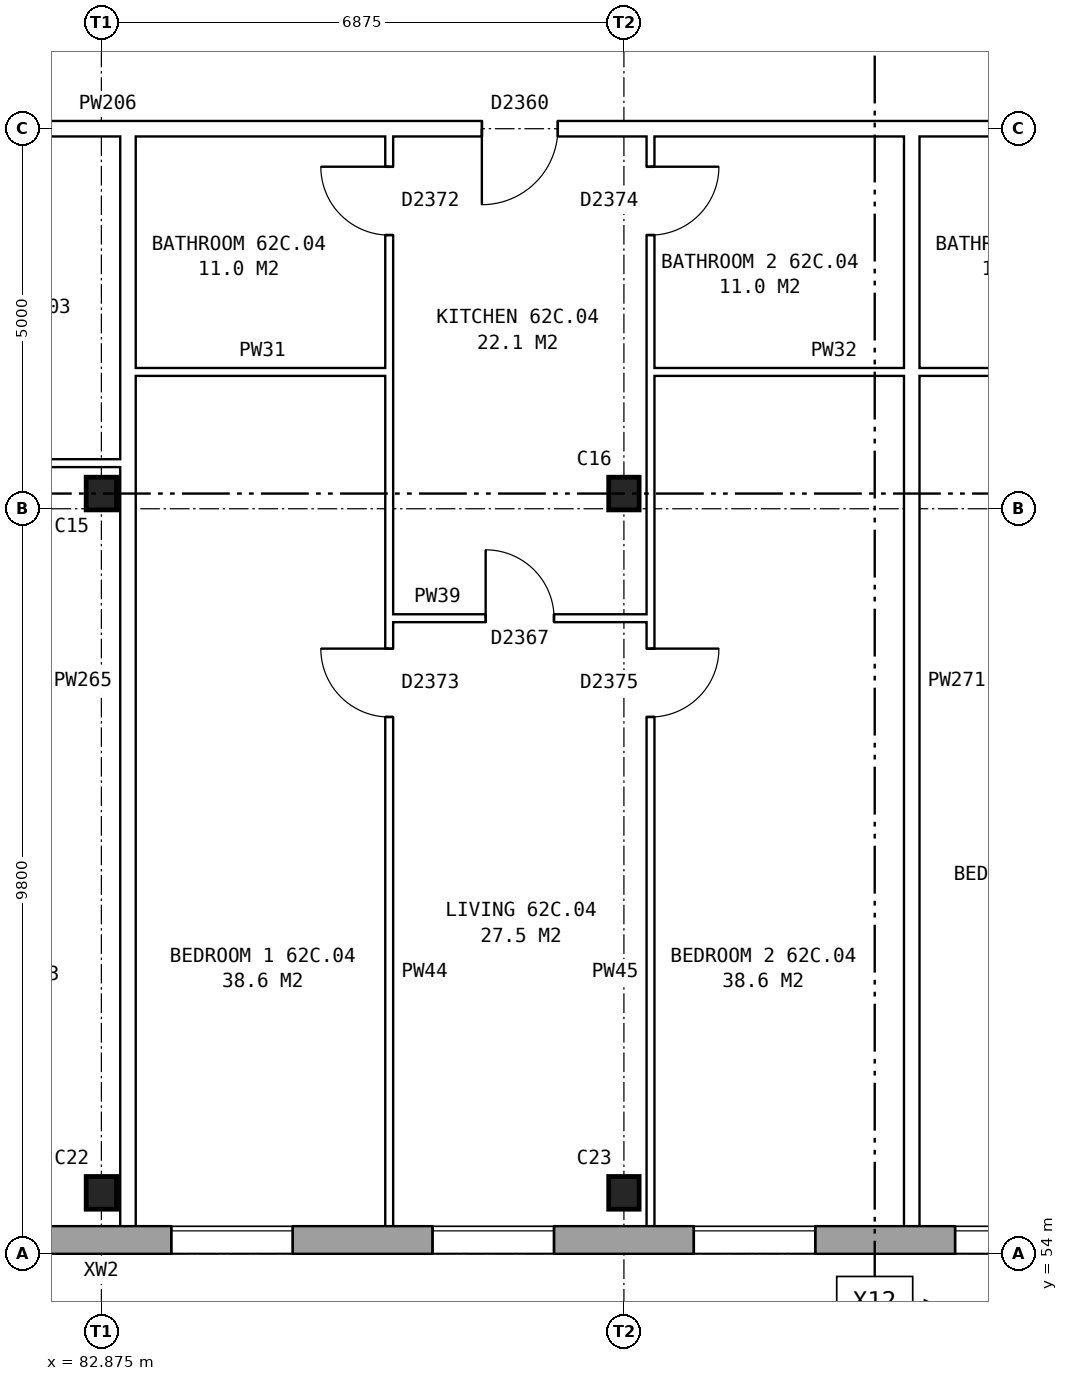
"""IFC4 building model, lengths in metres.
Left out: names, types, materials, properties, quantities, classifications, styles, units other than length and angle.
Written with IfcOpenShell. Run it as: python <this file> out.ifc"""

import sys

from ifc_helpers import new_model, si_unit, direction, frame, frame_2d, origin, origin_2d, place, context, subcontext, project, spatial, rectangle, i_section, extrude, element, fill, save


model = new_model("IFC4")
c1 = context("Model", 3, precision=1e-05, world=origin(), true_north=direction((0.0, 1.0)))
c2 = subcontext(c1, "Body", "Model", "MODEL_VIEW")
j1 = project(units=[si_unit("LENGTHUNIT", "METRE"), si_unit("PLANEANGLEUNIT", "RADIAN")], contexts=[c1])
p1 = place(None, origin())
s1 = spatial("IfcSite", under=j1, at=p1, CompositionType="ELEMENT")
p2 = place(p1, origin())
s2 = spatial("IfcBuilding", under=s1, at=p2, CompositionType="ELEMENT")
p3 = place(p2, frame((0.0, 0.0, 221.4)))
s3 = spatial("IfcBuildingStorey", under=s2, at=p3, CompositionType="ELEMENT", Elevation=221.4)
for number, where, z_axis, x_axis in (
    (1, (82.875, 54.8, 0.0), (0.0, 0.0, 1.0), (1.0, 0.0, 0.0)),
    (2, (89.75, 54.8, 0.0), (0.0, 0.0, 1.0), (1.0, 0.0, 0.0)),
    (3, (82.875, 64.0, 0.0), (0.0, 0.0, 1.0), (1.0, 0.0, 0.0)),
    (4, (89.75, 64.0, 0.0), (0.0, 0.0, 1.0), (1.0, 0.0, 0.0)),
):
    element("IfcColumn", number, at=place(p3, frame(where, z_axis=z_axis, x_axis=x_axis)), inside=s3, PredefinedType="COLUMN", context=c2, shape_type="SweptSolid", body=[
        extrude(i_section(OverallWidth=0.4, OverallDepth=0.43, WebThickness=0.04, FlangeThickness=0.04, at=origin_2d()), origin(), (0.0, 0.0, 1.0), 2.85),
    ])
p4 = place(p3, frame((75.95, 54.18, 0.0), z_axis=(0.0, 0.0, 1.0), x_axis=(1.0, 0.0, 0.0)))
e5 = element("IfcWall", 5, at=p4, inside=s3, PredefinedType="STANDARD", context=c2, shape_type="SweptSolid", body=[
    extrude(rectangle(XDim=55.1, YDim=0.36, at=frame_2d((27.55, 0.0))), origin(), (0.0, 0.0, 1.0), 2.85),
])
p5 = place(p4, frame((0.969, 0.0, 0.8)))
e6 = element("IfcOpeningElement", 6, at=p5, cuts=e5, PredefinedType="OPENING", context=c2, shape_type="SweptSolid", body=[
    extrude(rectangle(XDim=1.6, YDim=1.8, at=frame_2d((0.8, 0.9))), frame((0.0, 0.19, 0.0), z_axis=(0.0, -1.0, 0.0), x_axis=(1.0, 0.0, 0.0)), (0.0, 0.0, 1.0), 0.38),
])
p6 = place(p4, frame((4.406, 0.0, 0.8)))
e7 = element("IfcOpeningElement", 7, at=p6, cuts=e5, PredefinedType="OPENING", context=c2, shape_type="SweptSolid", body=[
    extrude(rectangle(XDim=1.6, YDim=1.8, at=frame_2d((0.8, 0.9))), frame((0.0, 0.19, 0.0), z_axis=(0.0, -1.0, 0.0), x_axis=(1.0, 0.0, 0.0)), (0.0, 0.0, 1.0), 0.38),
])
p7 = place(p4, frame((7.844, 0.0, 0.8)))
e8 = element("IfcOpeningElement", 8, at=p7, cuts=e5, PredefinedType="OPENING", context=c2, shape_type="SweptSolid", body=[
    extrude(rectangle(XDim=1.6, YDim=1.8, at=frame_2d((0.8, 0.9))), frame((0.0, 0.19, 0.0), z_axis=(0.0, -1.0, 0.0), x_axis=(1.0, 0.0, 0.0)), (0.0, 0.0, 1.0), 0.38),
])
p8 = place(p4, frame((11.281, 0.0, 0.8)))
e9 = element("IfcOpeningElement", 9, at=p8, cuts=e5, PredefinedType="OPENING", context=c2, shape_type="SweptSolid", body=[
    extrude(rectangle(XDim=1.6, YDim=1.8, at=frame_2d((0.8, 0.9))), frame((0.0, 0.19, 0.0), z_axis=(0.0, -1.0, 0.0), x_axis=(1.0, 0.0, 0.0)), (0.0, 0.0, 1.0), 0.38),
])
p9 = place(p4, frame((14.719, 0.0, 0.8)))
e10 = element("IfcOpeningElement", 10, at=p9, cuts=e5, PredefinedType="OPENING", context=c2, shape_type="SweptSolid", body=[
    extrude(rectangle(XDim=1.6, YDim=1.8, at=frame_2d((0.8, 0.9))), frame((0.0, 0.19, 0.0), z_axis=(0.0, -1.0, 0.0), x_axis=(1.0, 0.0, 0.0)), (0.0, 0.0, 1.0), 0.38),
])
p10 = place(p4, frame((18.156, 0.0, 0.8)))
e11 = element("IfcOpeningElement", 11, at=p10, cuts=e5, PredefinedType="OPENING", context=c2, shape_type="SweptSolid", body=[
    extrude(rectangle(XDim=1.6, YDim=1.8, at=frame_2d((0.8, 0.9))), frame((0.0, 0.19, 0.0), z_axis=(0.0, -1.0, 0.0), x_axis=(1.0, 0.0, 0.0)), (0.0, 0.0, 1.0), 0.38),
])
p11 = place(p4, frame((21.594, 0.0, 0.8)))
e12 = element("IfcOpeningElement", 12, at=p11, cuts=e5, PredefinedType="OPENING", context=c2, shape_type="SweptSolid", body=[
    extrude(rectangle(XDim=1.6, YDim=1.8, at=frame_2d((0.8, 0.9))), frame((0.0, 0.19, 0.0), z_axis=(0.0, -1.0, 0.0), x_axis=(1.0, 0.0, 0.0)), (0.0, 0.0, 1.0), 0.38),
])
p12 = place(p4, frame((25.031, 0.0, 0.8)))
e13 = element("IfcOpeningElement", 13, at=p12, cuts=e5, PredefinedType="OPENING", context=c2, shape_type="SweptSolid", body=[
    extrude(rectangle(XDim=1.6, YDim=1.8, at=frame_2d((0.8, 0.9))), frame((0.0, 0.19, 0.0), z_axis=(0.0, -1.0, 0.0), x_axis=(1.0, 0.0, 0.0)), (0.0, 0.0, 1.0), 0.38),
])
p13 = place(p4, frame((28.469, 0.0, 0.8)))
e14 = element("IfcOpeningElement", 14, at=p13, cuts=e5, PredefinedType="OPENING", context=c2, shape_type="SweptSolid", body=[
    extrude(rectangle(XDim=1.6, YDim=1.8, at=frame_2d((0.8, 0.9))), frame((0.0, 0.19, 0.0), z_axis=(0.0, -1.0, 0.0), x_axis=(1.0, 0.0, 0.0)), (0.0, 0.0, 1.0), 0.38),
])
p14 = place(p4, frame((31.906, 0.0, 0.8)))
e15 = element("IfcOpeningElement", 15, at=p14, cuts=e5, PredefinedType="OPENING", context=c2, shape_type="SweptSolid", body=[
    extrude(rectangle(XDim=1.6, YDim=1.8, at=frame_2d((0.8, 0.9))), frame((0.0, 0.19, 0.0), z_axis=(0.0, -1.0, 0.0), x_axis=(1.0, 0.0, 0.0)), (0.0, 0.0, 1.0), 0.38),
])
p15 = place(p4, frame((35.344, 0.0, 0.8)))
e16 = element("IfcOpeningElement", 16, at=p15, cuts=e5, PredefinedType="OPENING", context=c2, shape_type="SweptSolid", body=[
    extrude(rectangle(XDim=1.6, YDim=1.8, at=frame_2d((0.8, 0.9))), frame((0.0, 0.19, 0.0), z_axis=(0.0, -1.0, 0.0), x_axis=(1.0, 0.0, 0.0)), (0.0, 0.0, 1.0), 0.38),
])
p16 = place(p4, frame((38.781, 0.0, 0.8)))
e17 = element("IfcOpeningElement", 17, at=p16, cuts=e5, PredefinedType="OPENING", context=c2, shape_type="SweptSolid", body=[
    extrude(rectangle(XDim=1.6, YDim=1.8, at=frame_2d((0.8, 0.9))), frame((0.0, 0.19, 0.0), z_axis=(0.0, -1.0, 0.0), x_axis=(1.0, 0.0, 0.0)), (0.0, 0.0, 1.0), 0.38),
])
p17 = place(p4, frame((42.219, 0.0, 0.8)))
e18 = element("IfcOpeningElement", 18, at=p17, cuts=e5, PredefinedType="OPENING", context=c2, shape_type="SweptSolid", body=[
    extrude(rectangle(XDim=1.6, YDim=1.8, at=frame_2d((0.8, 0.9))), frame((0.0, 0.19, 0.0), z_axis=(0.0, -1.0, 0.0), x_axis=(1.0, 0.0, 0.0)), (0.0, 0.0, 1.0), 0.38),
])
p18 = place(p4, frame((45.656, 0.0, 0.8)))
e19 = element("IfcOpeningElement", 19, at=p18, cuts=e5, PredefinedType="OPENING", context=c2, shape_type="SweptSolid", body=[
    extrude(rectangle(XDim=1.6, YDim=1.8, at=frame_2d((0.8, 0.9))), frame((0.0, 0.19, 0.0), z_axis=(0.0, -1.0, 0.0), x_axis=(1.0, 0.0, 0.0)), (0.0, 0.0, 1.0), 0.38),
])
p19 = place(p4, frame((49.094, 0.0, 0.8)))
e20 = element("IfcOpeningElement", 20, at=p19, cuts=e5, PredefinedType="OPENING", context=c2, shape_type="SweptSolid", body=[
    extrude(rectangle(XDim=1.6, YDim=1.8, at=frame_2d((0.8, 0.9))), frame((0.0, 0.19, 0.0), z_axis=(0.0, -1.0, 0.0), x_axis=(1.0, 0.0, 0.0)), (0.0, 0.0, 1.0), 0.38),
])
p20 = place(p4, frame((52.531, 0.0, 0.8)))
e21 = element("IfcOpeningElement", 21, at=p20, cuts=e5, PredefinedType="OPENING", context=c2, shape_type="SweptSolid", body=[
    extrude(rectangle(XDim=1.6, YDim=1.8, at=frame_2d((0.8, 0.9))), frame((0.0, 0.19, 0.0), z_axis=(0.0, -1.0, 0.0), x_axis=(1.0, 0.0, 0.0)), (0.0, 0.0, 1.0), 0.38),
])
p21 = place(p3, frame((86.662, 62.36, 0.0), z_axis=(0.0, 0.0, 1.0), x_axis=(1.0, 0.0, 0.0)))
e22 = element("IfcWall", 22, at=p21, inside=s3, PredefinedType="PARTITIONING", context=c2, shape_type="SweptSolid", body=[
    extrude(rectangle(XDim=3.438, YDim=0.1, at=frame_2d((1.719, 0.0))), origin(), (0.0, 0.0, 1.0), 2.85),
])
p22 = place(p21, frame((1.269, 0.0, 0.0)))
e23 = element("IfcOpeningElement", 23, at=p22, cuts=e22, PredefinedType="OPENING", context=c2, shape_type="SweptSolid", body=[
    extrude(rectangle(XDim=0.9, YDim=2.1, at=frame_2d((0.45, 1.05))), frame((0.0, 0.06, 0.0), z_axis=(0.0, -1.0, 0.0), x_axis=(1.0, 0.0, 0.0)), (0.0, 0.0, 1.0), 0.12),
])
p23 = place(p3, frame((79.438, 64.4, 0.0), z_axis=(0.0, 0.0, 1.0), x_axis=(1.0, 0.0, 0.0)))
e24 = element("IfcWall", 24, at=p23, inside=s3, PredefinedType="PARTITIONING", context=c2, shape_type="SweptSolid", body=[
    extrude(rectangle(XDim=3.687, YDim=0.1, at=frame_2d((1.844, 0.0))), origin(), (0.0, 0.0, 1.0), 2.85),
])
p24 = place(p3, frame((83.325, 65.6, 0.0), z_axis=(0.0, 0.0, 1.0), x_axis=(1.0, 0.0, 0.0)))
e25 = element("IfcWall", 25, at=p24, inside=s3, PredefinedType="PARTITIONING", context=c2, shape_type="SweptSolid", body=[
    extrude(rectangle(XDim=3.337, YDim=0.1, at=frame_2d((1.668, 0.0))), origin(), (0.0, 0.0, 1.0), 2.85),
])
p25 = place(p3, frame((90.1, 65.6, 0.0), z_axis=(0.0, 0.0, 1.0), x_axis=(1.0, 0.0, 0.0)))
e26 = element("IfcWall", 26, at=p25, inside=s3, PredefinedType="PARTITIONING", context=c2, shape_type="SweptSolid", body=[
    extrude(rectangle(XDim=6.875, YDim=0.1, at=frame_2d((3.438, 0.0))), origin(), (0.0, 0.0, 1.0), 2.85),
])
p26 = place(p3, frame((75.64, 68.8, 0.0), z_axis=(0.0, 0.0, 1.0), x_axis=(1.0, 0.0, 0.0)))
e27 = element("IfcWall", 27, at=p26, inside=s3, PredefinedType="PARTITIONING", context=c2, shape_type="SweptSolid", body=[
    extrude(rectangle(XDim=55.72, YDim=0.2, at=frame_2d((27.86, 0.0))), origin(), (0.0, 0.0, 1.0), 2.85),
])
p27 = place(p26, frame((1.399, 0.0, 0.0)))
e28 = element("IfcOpeningElement", 28, at=p27, cuts=e27, PredefinedType="OPENING", context=c2, shape_type="SweptSolid", body=[
    extrude(rectangle(XDim=1.0, YDim=2.1, at=frame_2d((0.5, 1.05))), frame((0.0, 0.11, 0.0), z_axis=(0.0, -1.0, 0.0), x_axis=(1.0, 0.0, 0.0)), (0.0, 0.0, 1.0), 0.22),
])
p28 = place(p26, frame((12.241, 0.0, 0.0)))
e29 = element("IfcOpeningElement", 29, at=p28, cuts=e27, PredefinedType="OPENING", context=c2, shape_type="SweptSolid", body=[
    extrude(rectangle(XDim=1.0, YDim=2.1, at=frame_2d((0.5, 1.05))), frame((0.0, 0.11, 0.0), z_axis=(0.0, -1.0, 0.0), x_axis=(1.0, 0.0, 0.0)), (0.0, 0.0, 1.0), 0.22),
])
p29 = place(p26, frame((22.553, 0.0, 0.0)))
e30 = element("IfcOpeningElement", 30, at=p29, cuts=e27, PredefinedType="OPENING", context=c2, shape_type="SweptSolid", body=[
    extrude(rectangle(XDim=1.0, YDim=2.1, at=frame_2d((0.5, 1.05))), frame((0.0, 0.11, 0.0), z_axis=(0.0, -1.0, 0.0), x_axis=(1.0, 0.0, 0.0)), (0.0, 0.0, 1.0), 0.22),
])
p30 = place(p26, frame((32.866, 0.0, 0.0)))
e31 = element("IfcOpeningElement", 31, at=p30, cuts=e27, PredefinedType="OPENING", context=c2, shape_type="SweptSolid", body=[
    extrude(rectangle(XDim=1.0, YDim=2.1, at=frame_2d((0.5, 1.05))), frame((0.0, 0.11, 0.0), z_axis=(0.0, -1.0, 0.0), x_axis=(1.0, 0.0, 0.0)), (0.0, 0.0, 1.0), 0.22),
])
p31 = place(p26, frame((36.303, 0.0, 0.0)))
e32 = element("IfcOpeningElement", 32, at=p31, cuts=e27, PredefinedType="OPENING", context=c2, shape_type="SweptSolid", body=[
    extrude(rectangle(XDim=1.0, YDim=2.1, at=frame_2d((0.5, 1.05))), frame((0.0, 0.11, 0.0), z_axis=(0.0, -1.0, 0.0), x_axis=(1.0, 0.0, 0.0)), (0.0, 0.0, 1.0), 0.22),
])
p32 = place(p26, frame((46.616, 0.0, 0.0)))
e33 = element("IfcOpeningElement", 33, at=p32, cuts=e27, PredefinedType="OPENING", context=c2, shape_type="SweptSolid", body=[
    extrude(rectangle(XDim=1.0, YDim=2.1, at=frame_2d((0.5, 1.05))), frame((0.0, 0.11, 0.0), z_axis=(0.0, -1.0, 0.0), x_axis=(1.0, 0.0, 0.0)), (0.0, 0.0, 1.0), 0.22),
])
p33 = place(p26, frame((50.053, 0.0, 0.0)))
e34 = element("IfcOpeningElement", 34, at=p33, cuts=e27, PredefinedType="OPENING", context=c2, shape_type="SweptSolid", body=[
    extrude(rectangle(XDim=1.0, YDim=2.1, at=frame_2d((0.5, 1.05))), frame((0.0, 0.11, 0.0), z_axis=(0.0, -1.0, 0.0), x_axis=(1.0, 0.0, 0.0)), (0.0, 0.0, 1.0), 0.22),
])
p34 = place(p3, frame((83.225, 54.36, 0.0), z_axis=(0.0, 0.0, 1.0), x_axis=(0.0, 1.0, 0.0)))
e35 = element("IfcWall", 35, at=p34, inside=s3, PredefinedType="PARTITIONING", context=c2, shape_type="SweptSolid", body=[
    extrude(rectangle(XDim=14.34, YDim=0.2, at=frame_2d((7.17, 0.0))), origin(), (0.0, 0.0, 1.0), 2.85),
])
p35 = place(p3, frame((86.662, 54.36, 0.0), z_axis=(0.0, 0.0, 1.0), x_axis=(0.0, 1.0, 0.0)))
e36 = element("IfcWall", 36, at=p35, inside=s3, PredefinedType="PARTITIONING", context=c2, shape_type="SweptSolid", body=[
    extrude(rectangle(XDim=14.34, YDim=0.1, at=frame_2d((7.17, 0.0))), origin(), (0.0, 0.0, 1.0), 2.85),
])
p36 = place(p35, frame((6.7, 0.0, 0.0)))
e37 = element("IfcOpeningElement", 37, at=p36, cuts=e36, PredefinedType="OPENING", context=c2, shape_type="SweptSolid", body=[
    extrude(rectangle(XDim=0.9, YDim=2.1, at=frame_2d((0.45, 1.05))), frame((0.0, 0.06, 0.0), z_axis=(0.0, -1.0, 0.0), x_axis=(1.0, 0.0, 0.0)), (0.0, 0.0, 1.0), 0.12),
])
p37 = place(p35, frame((13.04, 0.0, 0.0)))
e38 = element("IfcOpeningElement", 38, at=p37, cuts=e36, PredefinedType="OPENING", context=c2, shape_type="SweptSolid", body=[
    extrude(rectangle(XDim=0.9, YDim=2.1, at=frame_2d((0.45, 1.05))), frame((0.0, 0.06, 0.0), z_axis=(0.0, -1.0, 0.0), x_axis=(1.0, 0.0, 0.0)), (0.0, 0.0, 1.0), 0.12),
])
p38 = place(p3, frame((90.1, 54.36, 0.0), z_axis=(0.0, 0.0, 1.0), x_axis=(0.0, 1.0, 0.0)))
e39 = element("IfcWall", 39, at=p38, inside=s3, PredefinedType="PARTITIONING", context=c2, shape_type="SweptSolid", body=[
    extrude(rectangle(XDim=14.34, YDim=0.1, at=frame_2d((7.17, 0.0))), origin(), (0.0, 0.0, 1.0), 2.85),
])
p39 = place(p38, frame((6.7, 0.0, 0.0)))
e40 = element("IfcOpeningElement", 40, at=p39, cuts=e39, PredefinedType="OPENING", context=c2, shape_type="SweptSolid", body=[
    extrude(rectangle(XDim=0.9, YDim=2.1, at=frame_2d((0.45, 1.05))), frame((0.0, 0.06, 0.0), z_axis=(0.0, -1.0, 0.0), x_axis=(1.0, 0.0, 0.0)), (0.0, 0.0, 1.0), 0.12),
])
p40 = place(p38, frame((13.04, 0.0, 0.0)))
e41 = element("IfcOpeningElement", 41, at=p40, cuts=e39, PredefinedType="OPENING", context=c2, shape_type="SweptSolid", body=[
    extrude(rectangle(XDim=0.9, YDim=2.1, at=frame_2d((0.45, 1.05))), frame((0.0, 0.06, 0.0), z_axis=(0.0, -1.0, 0.0), x_axis=(1.0, 0.0, 0.0)), (0.0, 0.0, 1.0), 0.12),
])
p41 = place(p3, frame((93.537, 54.36, 0.0), z_axis=(0.0, 0.0, 1.0), x_axis=(0.0, 1.0, 0.0)))
e42 = element("IfcWall", 42, at=p41, inside=s3, PredefinedType="PARTITIONING", context=c2, shape_type="SweptSolid", body=[
    extrude(rectangle(XDim=14.34, YDim=0.2, at=frame_2d((7.17, 0.0))), origin(), (0.0, 0.0, 1.0), 2.85),
])
p42 = place(p7, origin())
e43 = element("IfcWindow", 43, at=p42, inside=s3, PartitioningType="SINGLE_PANEL", PredefinedType="WINDOW", context=c2, shape_type="SweptSolid", body=[
    extrude(rectangle(XDim=1.6, YDim=1.8, at=frame_2d((0.8, 0.9))), frame((0.0, 0.15, 0.0), z_axis=(0.0, -1.0, 0.0), x_axis=(1.0, 0.0, 0.0)), (0.0, 0.0, 1.0), 0.06),
])
fill(e8, e43)
p43 = place(p8, origin())
e44 = element("IfcWindow", 44, at=p43, inside=s3, PartitioningType="SINGLE_PANEL", PredefinedType="WINDOW", context=c2, shape_type="SweptSolid", body=[
    extrude(rectangle(XDim=1.6, YDim=1.8, at=frame_2d((0.8, 0.9))), frame((0.0, 0.15, 0.0), z_axis=(0.0, -1.0, 0.0), x_axis=(1.0, 0.0, 0.0)), (0.0, 0.0, 1.0), 0.06),
])
fill(e9, e44)
p44 = place(p9, origin())
e45 = element("IfcWindow", 45, at=p44, inside=s3, PartitioningType="SINGLE_PANEL", PredefinedType="WINDOW", context=c2, shape_type="SweptSolid", body=[
    extrude(rectangle(XDim=1.6, YDim=1.8, at=frame_2d((0.8, 0.9))), frame((0.0, 0.15, 0.0), z_axis=(0.0, -1.0, 0.0), x_axis=(1.0, 0.0, 0.0)), (0.0, 0.0, 1.0), 0.06),
])
fill(e10, e45)
p45 = place(p10, origin())
e46 = element("IfcWindow", 46, at=p45, inside=s3, PartitioningType="SINGLE_PANEL", PredefinedType="WINDOW", context=c2, shape_type="SweptSolid", body=[
    extrude(rectangle(XDim=1.6, YDim=1.8, at=frame_2d((0.8, 0.9))), frame((0.0, 0.15, 0.0), z_axis=(0.0, -1.0, 0.0), x_axis=(1.0, 0.0, 0.0)), (0.0, 0.0, 1.0), 0.06),
])
fill(e11, e46)
p46 = place(p36, origin())
e47 = element("IfcDoor", 47, at=p46, inside=s3, OperationType="SINGLE_SWING_RIGHT", PredefinedType="DOOR", context=c2, shape_type="SweptSolid", body=[
    extrude(rectangle(XDim=0.9, YDim=2.1, at=frame_2d((0.45, 1.05))), frame((0.0, 0.025, 0.0), z_axis=(0.0, -1.0, 0.0), x_axis=(1.0, 0.0, 0.0)), (0.0, 0.0, 1.0), 0.05),
])
fill(e37, e47)
p47 = place(p39, frame((0.9, 0.0, 0.0), z_axis=(0.0, 0.0, 1.0), x_axis=(-1.0, 0.0, 0.0)))
e48 = element("IfcDoor", 48, at=p47, inside=s3, OperationType="SINGLE_SWING_LEFT", PredefinedType="DOOR", context=c2, shape_type="SweptSolid", body=[
    extrude(rectangle(XDim=0.9, YDim=2.1, at=frame_2d((0.45, 1.05))), frame((0.0, 0.025, 0.0), z_axis=(0.0, -1.0, 0.0), x_axis=(1.0, 0.0, 0.0)), (0.0, 0.0, 1.0), 0.05),
])
fill(e40, e48)
p48 = place(p28, frame((1.0, 0.0, 0.0), z_axis=(0.0, 0.0, 1.0), x_axis=(-1.0, 0.0, 0.0)))
e49 = element("IfcDoor", 49, at=p48, inside=s3, OperationType="SINGLE_SWING_RIGHT", PredefinedType="DOOR", context=c2, shape_type="SweptSolid", body=[
    extrude(rectangle(XDim=1.0, YDim=2.1, at=frame_2d((0.5, 1.05))), frame((0.0, 0.025, 0.0), z_axis=(0.0, -1.0, 0.0), x_axis=(1.0, 0.0, 0.0)), (0.0, 0.0, 1.0), 0.05),
])
fill(e29, e49)
p49 = place(p22, origin())
e50 = element("IfcDoor", 50, at=p49, inside=s3, OperationType="SINGLE_SWING_LEFT", PredefinedType="DOOR", context=c2, shape_type="SweptSolid", body=[
    extrude(rectangle(XDim=0.9, YDim=2.1, at=frame_2d((0.45, 1.05))), frame((0.0, 0.025, 0.0), z_axis=(0.0, -1.0, 0.0), x_axis=(1.0, 0.0, 0.0)), (0.0, 0.0, 1.0), 0.05),
])
fill(e23, e50)
p50 = place(p37, origin())
e51 = element("IfcDoor", 51, at=p50, inside=s3, OperationType="SINGLE_SWING_RIGHT", PredefinedType="DOOR", context=c2, shape_type="SweptSolid", body=[
    extrude(rectangle(XDim=0.9, YDim=2.1, at=frame_2d((0.45, 1.05))), frame((0.0, 0.025, 0.0), z_axis=(0.0, -1.0, 0.0), x_axis=(1.0, 0.0, 0.0)), (0.0, 0.0, 1.0), 0.05),
])
fill(e38, e51)
p51 = place(p40, frame((0.9, 0.0, 0.0), z_axis=(0.0, 0.0, 1.0), x_axis=(-1.0, 0.0, 0.0)))
e52 = element("IfcDoor", 52, at=p51, inside=s3, OperationType="SINGLE_SWING_LEFT", PredefinedType="DOOR", context=c2, shape_type="SweptSolid", body=[
    extrude(rectangle(XDim=0.9, YDim=2.1, at=frame_2d((0.45, 1.05))), frame((0.0, 0.025, 0.0), z_axis=(0.0, -1.0, 0.0), x_axis=(1.0, 0.0, 0.0)), (0.0, 0.0, 1.0), 0.05),
])
fill(e41, e52)
save(model, sys.argv[1])
